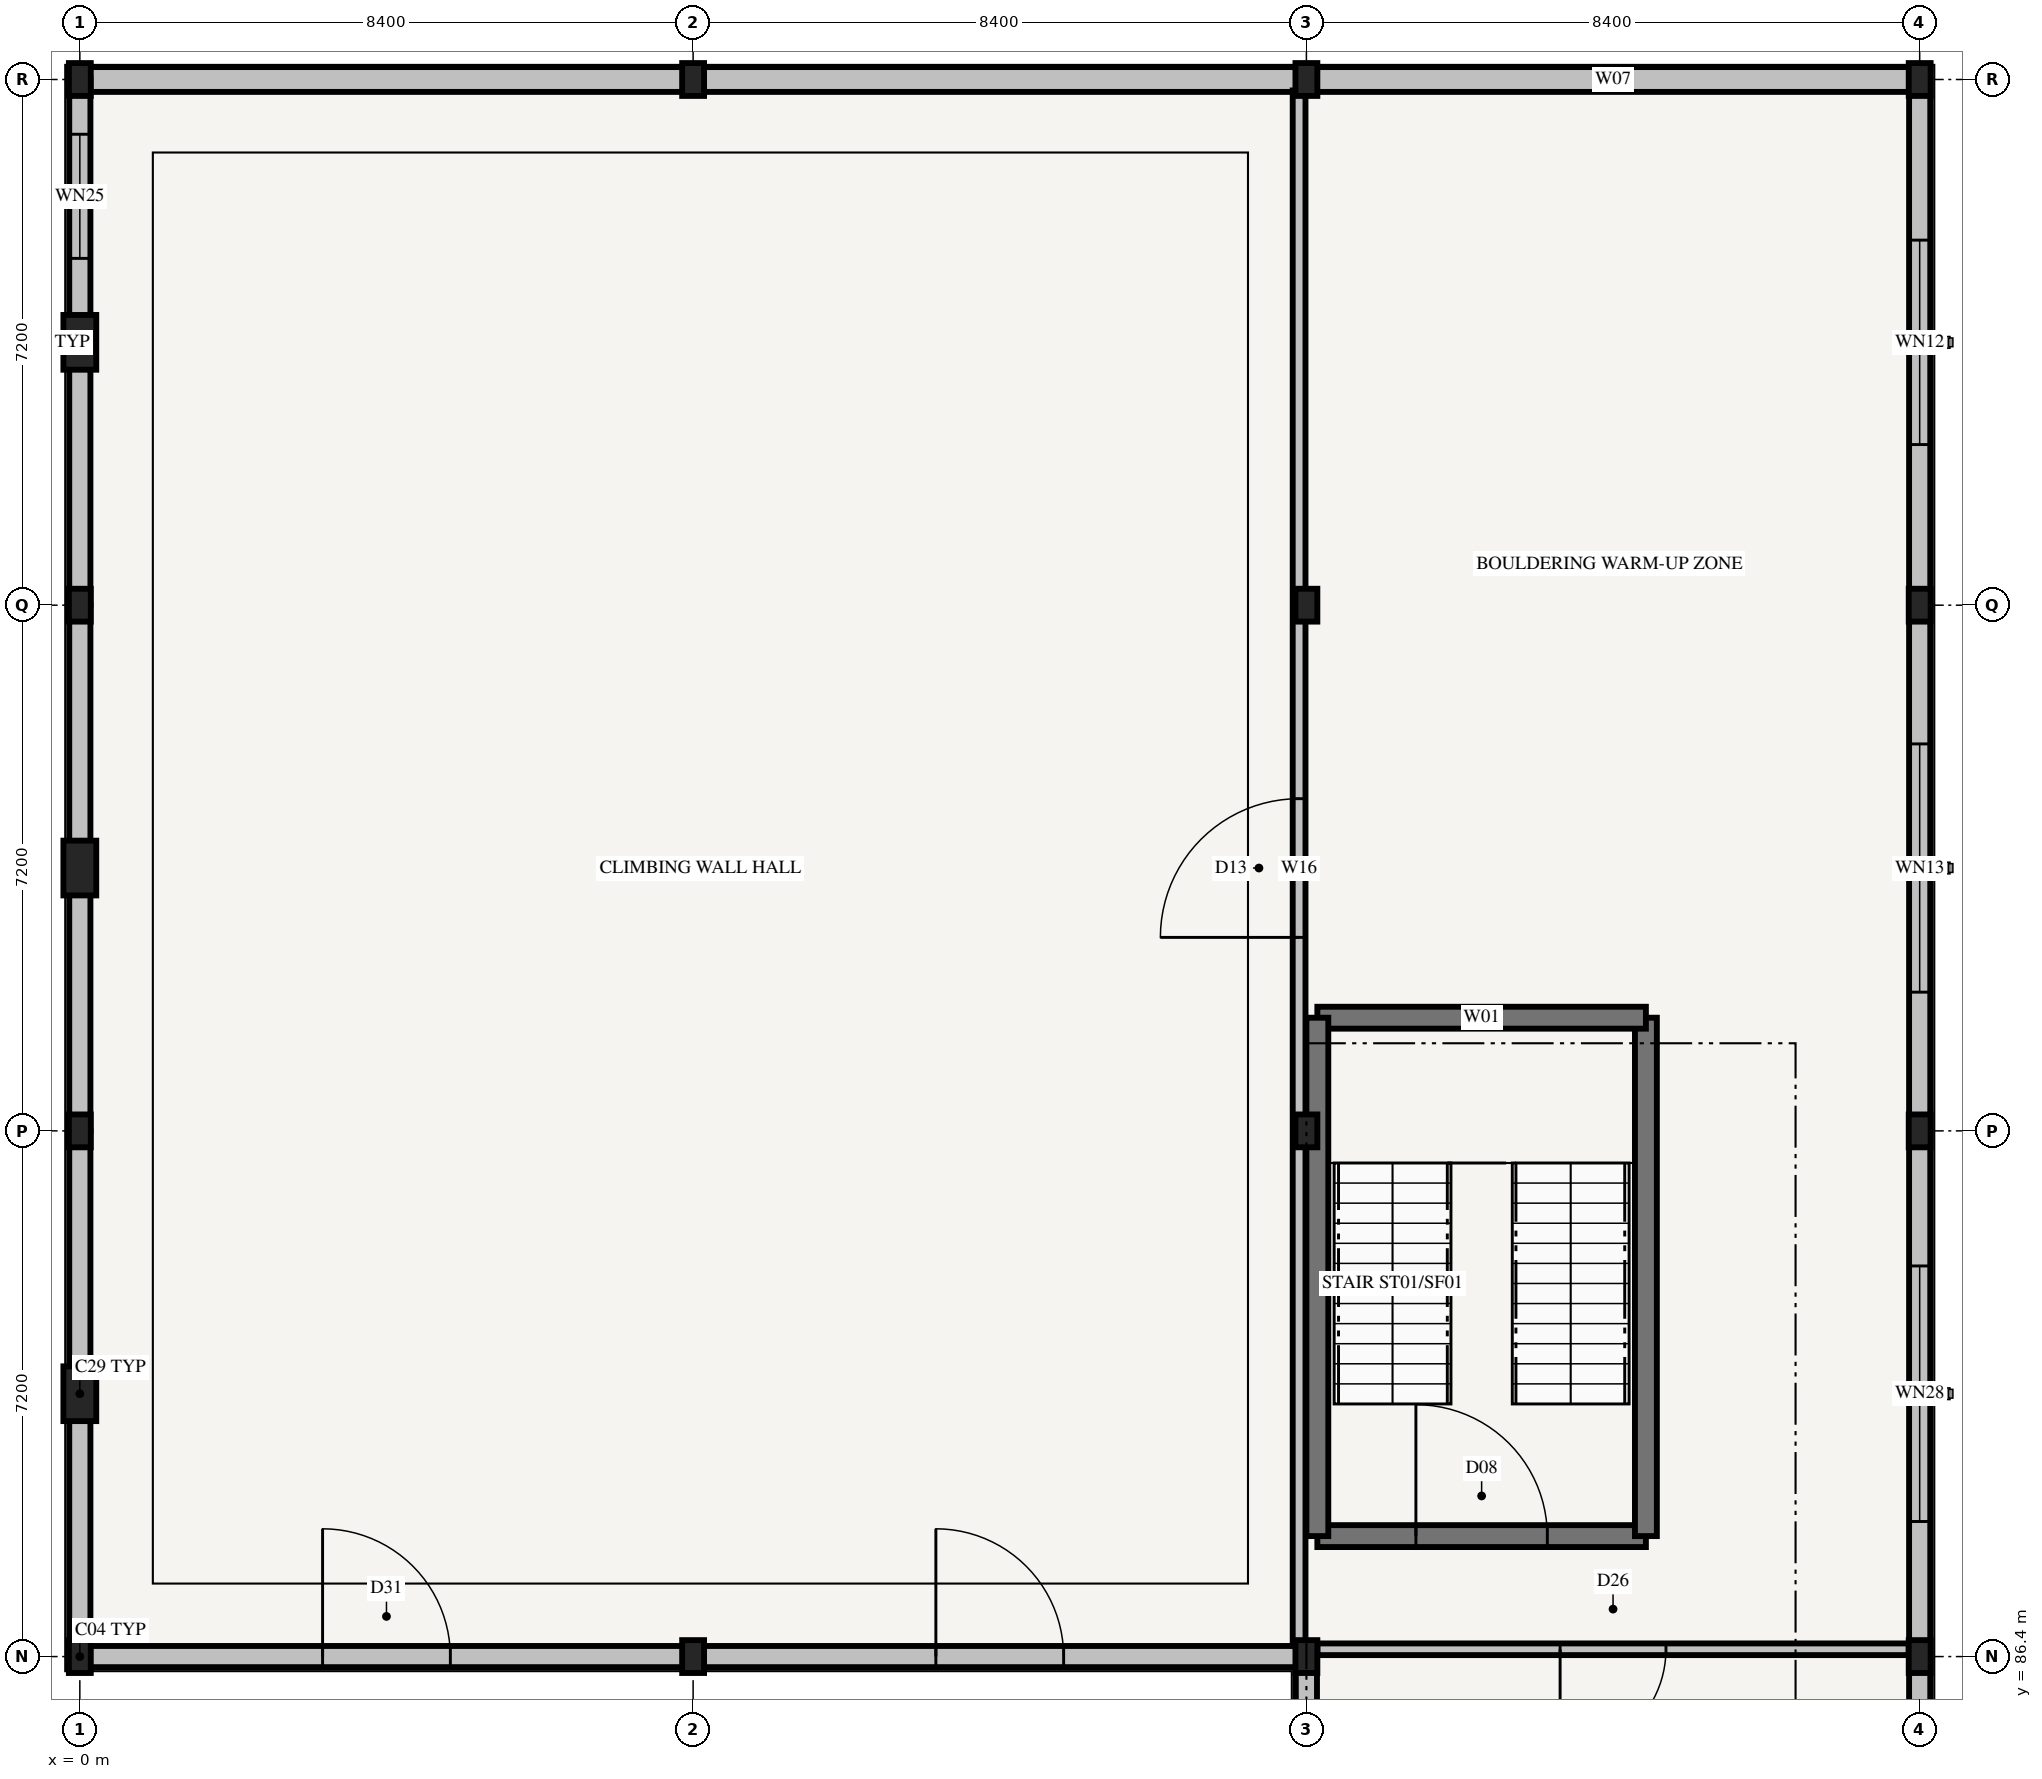
"""IFC4 building model, lengths in metres.
Left out: names, types, materials, properties, quantities, classifications, styles, units other than length and angle.
Written with IfcOpenShell. Run it as: python <this file> out.ifc"""

import sys

from ifc_helpers import new_model, si_unit, direction, frame, frame_2d, origin, origin_2d, place, context, subcontext, project, spatial, rectangle, i_section, extrude, element, fill, save


model = new_model("IFC4")
c1 = context("Model", 3, precision=1e-05, world=origin(), true_north=direction((0.0, 1.0)))
c2 = subcontext(c1, "Body", "Model", "MODEL_VIEW")
j1 = project(units=[si_unit("LENGTHUNIT", "METRE"), si_unit("PLANEANGLEUNIT", "RADIAN")], contexts=[c1])
p1 = place(None, origin())
s1 = spatial("IfcSite", under=j1, at=p1, CompositionType="ELEMENT")
p2 = place(p1, origin())
s2 = spatial("IfcBuilding", under=s1, at=p2, CompositionType="ELEMENT")
p3 = place(p2, origin())
s3 = spatial("IfcBuildingStorey", under=s2, at=p3, CompositionType="ELEMENT", Elevation=0.0)
for number, where, z_axis, x_axis in (
    (1, (0.0, 86.4, -0.42), (0.0, 0.0, 1.0), (1.0, 0.0, 0.0)),
    (2, (0.0, 93.6, -0.42), (0.0, 0.0, 1.0), (1.0, 0.0, 0.0)),
    (3, (0.0, 100.8, -0.42), (0.0, 0.0, 1.0), (1.0, 0.0, 0.0)),
    (4, (0.0, 108.0, -0.42), (0.0, 0.0, 1.0), (1.0, 0.0, 0.0)),
    (5, (8.4, 86.4, -0.42), (0.0, 0.0, 1.0), (1.0, 0.0, 0.0)),
    (6, (8.4, 108.0, -0.42), (0.0, 0.0, 1.0), (1.0, 0.0, 0.0)),
    (7, (16.8, 86.4, -0.42), (0.0, 0.0, 1.0), (1.0, 0.0, 0.0)),
    (8, (16.8, 93.6, -0.42), (0.0, 0.0, 1.0), (1.0, 0.0, 0.0)),
    (9, (16.8, 100.8, -0.42), (0.0, 0.0, 1.0), (1.0, 0.0, 0.0)),
    (10, (16.8, 108.0, -0.42), (0.0, 0.0, 1.0), (1.0, 0.0, 0.0)),
    (11, (25.2, 86.4, -0.42), (0.0, 0.0, 1.0), (1.0, 0.0, 0.0)),
    (12, (25.2, 93.6, -0.42), (0.0, 0.0, 1.0), (1.0, 0.0, 0.0)),
    (13, (25.2, 100.8, -0.42), (0.0, 0.0, 1.0), (1.0, 0.0, 0.0)),
    (14, (25.2, 108.0, -0.42), (0.0, 0.0, 1.0), (1.0, 0.0, 0.0)),
):
    element("IfcColumn", number, at=place(p3, frame(where, z_axis=z_axis, x_axis=x_axis)), inside=s3, PredefinedType="COLUMN", context=c2, shape_type="SweptSolid", body=[
        extrude(i_section(OverallWidth=0.3, OverallDepth=0.45, WebThickness=0.014, FlangeThickness=0.026, FilletRadius=0.027, at=origin_2d()), origin(), (0.0, 0.0, 1.0), 4.92),
    ])
for number, where, z_axis, x_axis in (
    (15, (0.0, 90.0, 0.0), (0.0, 0.0, 1.0), (1.0, 0.0, 0.0)),
    (16, (0.0, 97.2, 0.0), (0.0, 0.0, 1.0), (1.0, 0.0, 0.0)),
    (17, (0.0, 104.4, 0.0), (0.0, 0.0, 1.0), (1.0, 0.0, 0.0)),
):
    element("IfcColumn", number, at=place(p3, frame(where, z_axis=z_axis, x_axis=x_axis)), inside=s3, PredefinedType="PILASTER", context=c2, shape_type="SweptSolid", body=[
        extrude(rectangle(XDim=0.45, YDim=0.75, at=origin_2d()), origin(), (0.0, 0.0, 1.0), 4.5),
    ])
p4 = place(p3, frame((16.8, 86.4, 0.0), z_axis=(0.0, 0.0, 1.0), x_axis=(0.0, -1.0, 0.0)))
e18 = element("IfcWall", 18, at=p4, inside=s3, PredefinedType="STANDARD", context=c2, shape_type="SweptSolid", body=[
    extrude(rectangle(XDim=7.2, YDim=0.29, at=frame_2d((3.6, 0.0))), origin(), (0.0, 0.0, 1.0), 3.705),
])
p5 = place(p4, frame((1.9, 0.0, 0.85)))
e19 = element("IfcOpeningElement", 19, at=p5, cuts=e18, PredefinedType="OPENING", context=c2, shape_type="SweptSolid", body=[
    extrude(rectangle(XDim=3.4, YDim=2.6, at=frame_2d((1.7, 1.3))), frame((0.0, 0.17, 0.0), z_axis=(0.0, -1.0, 0.0), x_axis=(1.0, 0.0, 0.0)), (0.0, 0.0, 1.0), 0.34),
])
p6 = place(p3, frame((25.2, 79.2, 0.0), z_axis=(0.0, 0.0, 1.0), x_axis=(0.0, 1.0, 0.0)))
e20 = element("IfcWall", 20, at=p6, inside=s3, PredefinedType="STANDARD", context=c2, shape_type="SweptSolid", body=[
    extrude(rectangle(XDim=7.2, YDim=0.29, at=frame_2d((3.6, 0.0))), origin(), (0.0, 0.0, 1.0), 3.705),
])
p7 = place(p6, frame((1.6, 0.0, 0.85)))
e21 = element("IfcOpeningElement", 21, at=p7, cuts=e20, PredefinedType="OPENING", context=c2, shape_type="SweptSolid", body=[
    extrude(rectangle(XDim=4.0, YDim=1.85, at=frame_2d((2.0, 0.925))), frame((0.0, 0.17, 0.0), z_axis=(0.0, -1.0, 0.0), x_axis=(1.0, 0.0, 0.0)), (0.0, 0.0, 1.0), 0.34),
])
p8 = place(p3, frame((25.2, 86.4, 0.0), z_axis=(0.0, 0.0, 1.0), x_axis=(0.0, 1.0, 0.0)))
e22 = element("IfcWall", 22, at=p8, inside=s3, PredefinedType="STANDARD", context=c2, shape_type="SweptSolid", body=[
    extrude(rectangle(XDim=7.2, YDim=0.29, at=frame_2d((3.6, 0.0))), origin(), (0.0, 0.0, 1.0), 3.705),
])
p9 = place(p8, frame((1.85, 0.0, 0.85)))
e23 = element("IfcOpeningElement", 23, at=p9, cuts=e22, PredefinedType="OPENING", context=c2, shape_type="SweptSolid", body=[
    extrude(rectangle(XDim=3.5, YDim=1.7, at=frame_2d((1.75, 0.85))), frame((0.0, 0.17, 0.0), z_axis=(0.0, -1.0, 0.0), x_axis=(1.0, 0.0, 0.0)), (0.0, 0.0, 1.0), 0.34),
])
p10 = place(p3, frame((25.2, 93.6, 0.0), z_axis=(0.0, 0.0, 1.0), x_axis=(0.0, 1.0, 0.0)))
e24 = element("IfcWall", 24, at=p10, inside=s3, PredefinedType="STANDARD", context=c2, shape_type="SweptSolid", body=[
    extrude(rectangle(XDim=7.2, YDim=0.29, at=frame_2d((3.6, 0.0))), origin(), (0.0, 0.0, 1.0), 3.805),
])
p11 = place(p10, frame((1.9, 0.0, 0.85)))
e25 = element("IfcOpeningElement", 25, at=p11, cuts=e24, PredefinedType="OPENING", context=c2, shape_type="SweptSolid", body=[
    extrude(rectangle(XDim=3.4, YDim=2.6, at=frame_2d((1.7, 1.3))), frame((0.0, 0.17, 0.0), z_axis=(0.0, -1.0, 0.0), x_axis=(1.0, 0.0, 0.0)), (0.0, 0.0, 1.0), 0.34),
])
p12 = place(p3, frame((25.2, 100.8, 0.0), z_axis=(0.0, 0.0, 1.0), x_axis=(0.0, 1.0, 0.0)))
e26 = element("IfcWall", 26, at=p12, inside=s3, PredefinedType="STANDARD", context=c2, shape_type="SweptSolid", body=[
    extrude(rectangle(XDim=7.2, YDim=0.29, at=frame_2d((3.6, 0.0))), origin(), (0.0, 0.0, 1.0), 3.805),
])
p13 = place(p12, frame((2.2, 0.0, 0.85)))
e27 = element("IfcOpeningElement", 27, at=p13, cuts=e26, PredefinedType="OPENING", context=c2, shape_type="SweptSolid", body=[
    extrude(rectangle(XDim=2.8, YDim=2.2, at=frame_2d((1.4, 1.1))), frame((0.0, 0.17, 0.0), z_axis=(0.0, -1.0, 0.0), x_axis=(1.0, 0.0, 0.0)), (0.0, 0.0, 1.0), 0.34),
])
p14 = place(p3, frame((25.2, 108.0, 0.0), z_axis=(0.0, 0.0, 1.0), x_axis=(-1.0, 0.0, 0.0)))
e28 = element("IfcWall", 28, at=p14, inside=s3, PredefinedType="STANDARD", context=c2, shape_type="SweptSolid", body=[
    extrude(rectangle(XDim=8.4, YDim=0.34, at=frame_2d((4.2, 0.0))), origin(), (0.0, 0.0, 1.0), 3.805),
])
p15 = place(p3, frame((16.8, 108.0, 0.0), z_axis=(0.0, 0.0, 1.0), x_axis=(-1.0, 0.0, 0.0)))
e29 = element("IfcWall", 29, at=p15, inside=s3, PredefinedType="STANDARD", context=c2, shape_type="SweptSolid", body=[
    extrude(rectangle(XDim=8.4, YDim=0.34, at=frame_2d((4.2, 0.0))), origin(), (0.0, 0.0, 1.0), 3.865),
])
p16 = place(p3, frame((8.4, 108.0, 0.0), z_axis=(0.0, 0.0, 1.0), x_axis=(-1.0, 0.0, 0.0)))
e30 = element("IfcWall", 30, at=p16, inside=s3, PredefinedType="STANDARD", context=c2, shape_type="SweptSolid", body=[
    extrude(rectangle(XDim=8.4, YDim=0.34, at=frame_2d((4.2, 0.0))), origin(), (0.0, 0.0, 1.0), 4.045),
])
p17 = place(p3, frame((0.0, 108.0, 0.0), z_axis=(0.0, 0.0, 1.0), x_axis=(0.0, -1.0, 0.0)))
e31 = element("IfcWall", 31, at=p17, inside=s3, PredefinedType="STANDARD", context=c2, shape_type="SweptSolid", body=[
    extrude(rectangle(XDim=7.2, YDim=0.29, at=frame_2d((3.6, 0.0))), origin(), (0.0, 0.0, 1.0), 4.045),
])
p18 = place(p17, frame((0.75, 0.0, 0.85)))
e32 = element("IfcOpeningElement", 32, at=p18, cuts=e31, PredefinedType="OPENING", context=c2, shape_type="SweptSolid", body=[
    extrude(rectangle(XDim=1.7, YDim=1.25, at=frame_2d((0.85, 0.625))), frame((0.0, 0.17, 0.0), z_axis=(0.0, -1.0, 0.0), x_axis=(1.0, 0.0, 0.0)), (0.0, 0.0, 1.0), 0.34),
])
p19 = place(p3, frame((0.0, 100.8, 0.0), z_axis=(0.0, 0.0, 1.0), x_axis=(0.0, -1.0, 0.0)))
e33 = element("IfcWall", 33, at=p19, inside=s3, PredefinedType="STANDARD", context=c2, shape_type="SweptSolid", body=[
    extrude(rectangle(XDim=7.2, YDim=0.29, at=frame_2d((3.6, 0.0))), origin(), (0.0, 0.0, 1.0), 4.045),
])
p20 = place(p3, frame((0.0, 93.6, 0.0), z_axis=(0.0, 0.0, 1.0), x_axis=(0.0, -1.0, 0.0)))
e34 = element("IfcWall", 34, at=p20, inside=s3, PredefinedType="STANDARD", context=c2, shape_type="SweptSolid", body=[
    extrude(rectangle(XDim=7.2, YDim=0.29, at=frame_2d((3.6, 0.0))), origin(), (0.0, 0.0, 1.0), 3.885),
])
p21 = place(p3, frame((0.0, 86.4, 0.0), z_axis=(0.0, 0.0, 1.0), x_axis=(1.0, 0.0, 0.0)))
e35 = element("IfcWall", 35, at=p21, inside=s3, PredefinedType="STANDARD", context=c2, shape_type="SweptSolid", body=[
    extrude(rectangle(XDim=8.4, YDim=0.29, at=frame_2d((4.2, 0.0))), origin(), (0.0, 0.0, 1.0), 3.885),
])
p22 = place(p21, frame((3.325, 0.0, 0.0)))
e36 = element("IfcOpeningElement", 36, at=p22, cuts=e35, PredefinedType="OPENING", context=c2, shape_type="SweptSolid", body=[
    extrude(rectangle(XDim=1.75, YDim=2.35, at=frame_2d((0.875, 1.175))), frame((0.0, 0.17, 0.0), z_axis=(0.0, -1.0, 0.0), x_axis=(1.0, 0.0, 0.0)), (0.0, 0.0, 1.0), 0.34),
])
p23 = place(p3, frame((8.4, 86.4, 0.0), z_axis=(0.0, 0.0, 1.0), x_axis=(1.0, 0.0, 0.0)))
e37 = element("IfcWall", 37, at=p23, inside=s3, PredefinedType="STANDARD", context=c2, shape_type="SweptSolid", body=[
    extrude(rectangle(XDim=8.4, YDim=0.29, at=frame_2d((4.2, 0.0))), origin(), (0.0, 0.0, 1.0), 3.705),
])
p24 = place(p23, frame((3.325, 0.0, 0.0)))
e38 = element("IfcOpeningElement", 38, at=p24, cuts=e37, PredefinedType="OPENING", context=c2, shape_type="SweptSolid", body=[
    extrude(rectangle(XDim=1.75, YDim=2.35, at=frame_2d((0.875, 1.175))), frame((0.0, 0.17, 0.0), z_axis=(0.0, -1.0, 0.0), x_axis=(1.0, 0.0, 0.0)), (0.0, 0.0, 1.0), 0.34),
])
p25 = place(p3, frame((16.95, 88.05, 0.0), z_axis=(0.0, 0.0, 1.0), x_axis=(1.0, 0.0, 0.0)))
e39 = element("IfcWall", 39, at=p25, inside=s3, PredefinedType="SHEAR", context=c2, shape_type="SweptSolid", body=[
    extrude(rectangle(XDim=4.5, YDim=0.3, at=frame_2d((2.25, 0.0))), origin(), (0.0, 0.0, 1.0), 4.32),
])
p26 = place(p25, frame((1.35, 0.0, 0.0)))
e40 = element("IfcOpeningElement", 40, at=p26, cuts=e39, PredefinedType="OPENING", context=c2, shape_type="SweptSolid", body=[
    extrude(rectangle(XDim=1.8, YDim=2.2, at=frame_2d((0.9, 1.1))), frame((0.0, 0.175, 0.0), z_axis=(0.0, -1.0, 0.0), x_axis=(1.0, 0.0, 0.0)), (0.0, 0.0, 1.0), 0.35),
])
p27 = place(p3, frame((21.45, 88.05, 0.0), z_axis=(0.0, 0.0, 1.0), x_axis=(0.0, 1.0, 0.0)))
e41 = element("IfcWall", 41, at=p27, inside=s3, PredefinedType="SHEAR", context=c2, shape_type="SweptSolid", body=[
    extrude(rectangle(XDim=7.1, YDim=0.3, at=frame_2d((3.55, 0.0))), origin(), (0.0, 0.0, 1.0), 4.32),
])
p28 = place(p3, frame((21.45, 95.15, 0.0), z_axis=(0.0, 0.0, 1.0), x_axis=(-1.0, 0.0, 0.0)))
e42 = element("IfcWall", 42, at=p28, inside=s3, PredefinedType="SHEAR", context=c2, shape_type="SweptSolid", body=[
    extrude(rectangle(XDim=4.5, YDim=0.3, at=frame_2d((2.25, 0.0))), origin(), (0.0, 0.0, 1.0), 4.32),
])
p29 = place(p3, frame((16.95, 95.15, 0.0), z_axis=(0.0, 0.0, 1.0), x_axis=(0.0, -1.0, 0.0)))
e43 = element("IfcWall", 43, at=p29, inside=s3, PredefinedType="SHEAR", context=c2, shape_type="SweptSolid", body=[
    extrude(rectangle(XDim=7.1, YDim=0.3, at=frame_2d((3.55, 0.0))), origin(), (0.0, 0.0, 1.0), 4.32),
])
p30 = place(p3, frame((16.7, 86.55, 0.0), z_axis=(0.0, 0.0, 1.0), x_axis=(0.0, 1.0, 0.0)))
e44 = element("IfcWall", 44, at=p30, inside=s3, PredefinedType="PARTITIONING", context=c2, shape_type="SweptSolid", body=[
    extrude(rectangle(XDim=21.3, YDim=0.175, at=frame_2d((10.65, 0.0))), origin(), (0.0, 0.0, 1.0), 3.62),
])
p31 = place(p30, frame((9.7, 0.0, 0.0)))
e45 = element("IfcOpeningElement", 45, at=p31, cuts=e44, PredefinedType="OPENING", context=c2, shape_type="SweptSolid", body=[
    extrude(rectangle(XDim=1.9, YDim=2.35, at=frame_2d((0.95, 1.175))), frame((0.0, 0.112, 0.0), z_axis=(0.0, -1.0, 0.0), x_axis=(1.0, 0.0, 0.0)), (0.0, 0.0, 1.0), 0.225),
])
p32 = place(p3, frame((16.95, 86.5, 0.0), z_axis=(0.0, 0.0, 1.0), x_axis=(1.0, 0.0, 0.0)))
e46 = element("IfcWall", 46, at=p32, inside=s3, PredefinedType="PARTITIONING", context=c2, shape_type="SweptSolid", body=[
    extrude(rectangle(XDim=8.1, YDim=0.16, at=frame_2d((4.05, 0.0))), origin(), (0.0, 0.0, 1.0), 3.62),
])
p33 = place(p32, frame((3.325, 0.0, 0.0)))
e47 = element("IfcOpeningElement", 47, at=p33, cuts=e46, PredefinedType="OPENING", context=c2, shape_type="SweptSolid", body=[
    extrude(rectangle(XDim=1.45, YDim=2.2, at=frame_2d((0.725, 1.1))), frame((0.0, 0.105, 0.0), z_axis=(0.0, -1.0, 0.0), x_axis=(1.0, 0.0, 0.0)), (0.0, 0.0, 1.0), 0.21),
])
p34 = place(p9, origin())
e48 = element("IfcWindow", 48, at=p34, inside=s3, PartitioningType="SINGLE_PANEL", PredefinedType="WINDOW", context=c2, shape_type="SweptSolid", body=[
    extrude(rectangle(XDim=3.5, YDim=1.7, at=frame_2d((1.75, 0.85))), frame((0.0, 0.03, 0.0), z_axis=(0.0, -1.0, 0.0), x_axis=(1.0, 0.0, 0.0)), (0.0, 0.0, 1.0), 0.06),
])
fill(e23, e48)
p35 = place(p11, origin())
e49 = element("IfcWindow", 49, at=p35, inside=s3, PartitioningType="SINGLE_PANEL", PredefinedType="WINDOW", context=c2, shape_type="SweptSolid", body=[
    extrude(rectangle(XDim=3.4, YDim=2.6, at=frame_2d((1.7, 1.3))), frame((0.0, 0.03, 0.0), z_axis=(0.0, -1.0, 0.0), x_axis=(1.0, 0.0, 0.0)), (0.0, 0.0, 1.0), 0.06),
])
fill(e25, e49)
p36 = place(p13, origin())
e50 = element("IfcWindow", 50, at=p36, inside=s3, PartitioningType="SINGLE_PANEL", PredefinedType="WINDOW", context=c2, shape_type="SweptSolid", body=[
    extrude(rectangle(XDim=2.8, YDim=2.2, at=frame_2d((1.4, 1.1))), frame((0.0, 0.03, 0.0), z_axis=(0.0, -1.0, 0.0), x_axis=(1.0, 0.0, 0.0)), (0.0, 0.0, 1.0), 0.06),
])
fill(e27, e50)
p37 = place(p18, origin())
e51 = element("IfcWindow", 51, at=p37, inside=s3, PartitioningType="SINGLE_PANEL", PredefinedType="WINDOW", context=c2, shape_type="SweptSolid", body=[
    extrude(rectangle(XDim=1.7, YDim=1.25, at=frame_2d((0.85, 0.625))), frame((0.0, 0.03, 0.0), z_axis=(0.0, -1.0, 0.0), x_axis=(1.0, 0.0, 0.0)), (0.0, 0.0, 1.0), 0.06),
])
fill(e32, e51)
p38 = place(p22, frame((1.75, 0.0, 0.0), z_axis=(0.0, 0.0, 1.0), x_axis=(-1.0, 0.0, 0.0)))
e52 = element("IfcDoor", 52, at=p38, inside=s3, OperationType="DOUBLE_DOOR_SINGLE_SWING", PredefinedType="DOOR", context=c2, shape_type="SweptSolid", body=[
    extrude(rectangle(XDim=1.75, YDim=2.35, at=frame_2d((0.875, 1.175))), frame((0.0, 0.025, 0.0), z_axis=(0.0, -1.0, 0.0), x_axis=(1.0, 0.0, 0.0)), (0.0, 0.0, 1.0), 0.05),
])
fill(e36, e52)
p39 = place(p24, frame((1.75, 0.0, 0.0), z_axis=(0.0, 0.0, 1.0), x_axis=(-1.0, 0.0, 0.0)))
e53 = element("IfcDoor", 53, at=p39, inside=s3, OperationType="DOUBLE_DOOR_SINGLE_SWING", PredefinedType="DOOR", context=c2, shape_type="SweptSolid", body=[
    extrude(rectangle(XDim=1.75, YDim=2.35, at=frame_2d((0.875, 1.175))), frame((0.0, 0.025, 0.0), z_axis=(0.0, -1.0, 0.0), x_axis=(1.0, 0.0, 0.0)), (0.0, 0.0, 1.0), 0.05),
])
fill(e38, e53)
p40 = place(p26, frame((1.8, 0.0, 0.0), z_axis=(0.0, 0.0, 1.0), x_axis=(-1.0, 0.0, 0.0)))
e54 = element("IfcDoor", 54, at=p40, inside=s3, OperationType="DOUBLE_DOOR_SINGLE_SWING", PredefinedType="DOOR", context=c2, shape_type="SweptSolid", body=[
    extrude(rectangle(XDim=1.8, YDim=2.2, at=frame_2d((0.9, 1.1))), frame((0.0, 0.025, 0.0), z_axis=(0.0, -1.0, 0.0), x_axis=(1.0, 0.0, 0.0)), (0.0, 0.0, 1.0), 0.05),
])
fill(e40, e54)
p41 = place(p31, origin())
e55 = element("IfcDoor", 55, at=p41, inside=s3, OperationType="DOUBLE_DOOR_SINGLE_SWING", PredefinedType="DOOR", context=c2, shape_type="SweptSolid", body=[
    extrude(rectangle(XDim=1.9, YDim=2.35, at=frame_2d((0.95, 1.175))), frame((0.0, 0.025, 0.0), z_axis=(0.0, -1.0, 0.0), x_axis=(1.0, 0.0, 0.0)), (0.0, 0.0, 1.0), 0.05),
])
fill(e45, e55)
p42 = place(p33, origin())
e56 = element("IfcDoor", 56, at=p42, inside=s3, OperationType="SINGLE_SWING_RIGHT", PredefinedType="DOOR", context=c2, shape_type="SweptSolid", body=[
    extrude(rectangle(XDim=1.45, YDim=2.2, at=frame_2d((0.725, 1.1))), frame((0.0, 0.025, 0.0), z_axis=(0.0, -1.0, 0.0), x_axis=(1.0, 0.0, 0.0)), (0.0, 0.0, 1.0), 0.05),
])
fill(e47, e56)
save(model, sys.argv[1])
